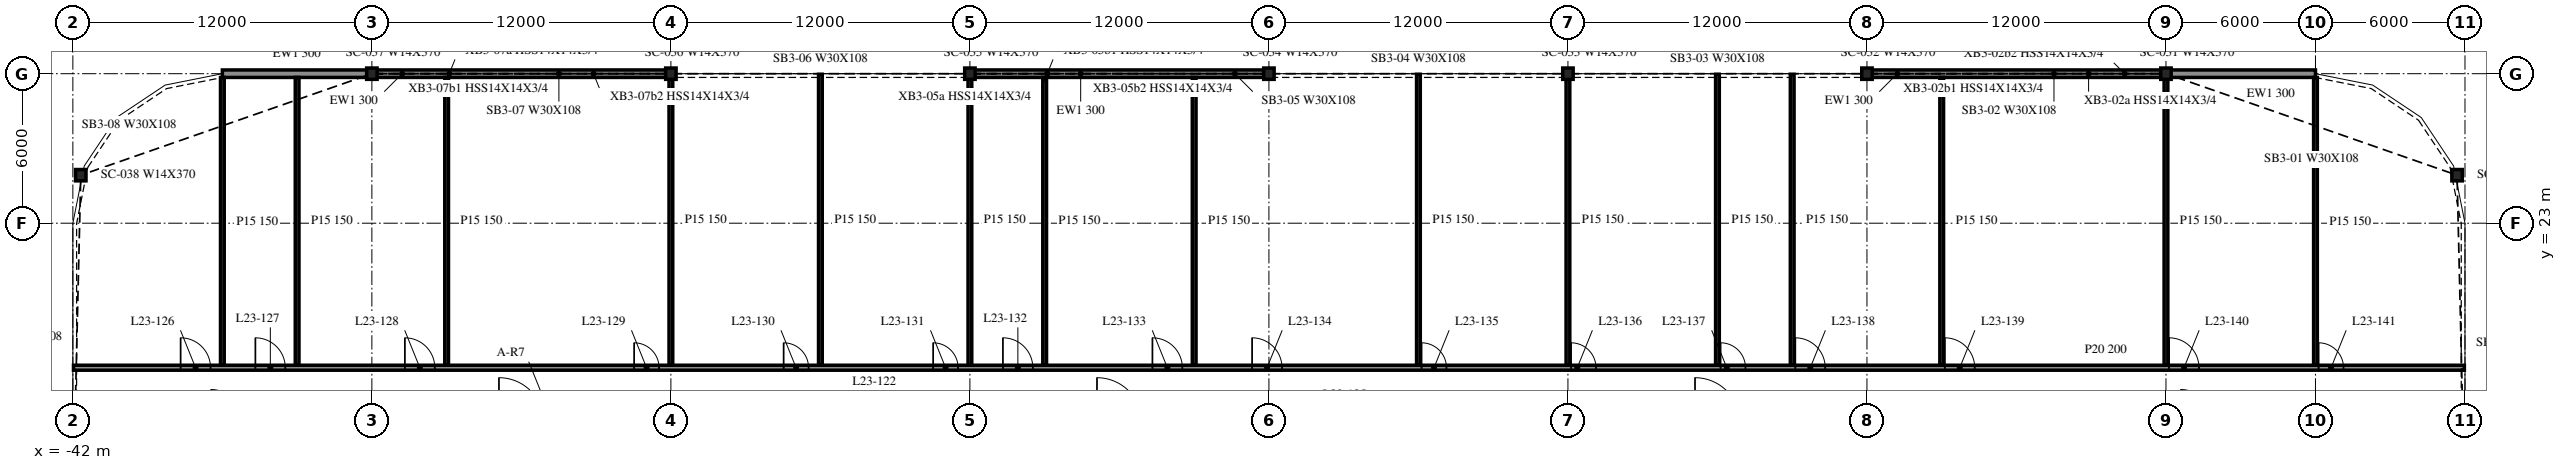
"""IFC4 building model, lengths in metres.
Left out: names, types, materials, properties, quantities, classifications, styles, units other than length and angle.
Written with IfcOpenShell. Run it as: python <this file> out.ifc"""

import sys

from ifc_helpers import new_model, si_unit, direction, frame, frame_2d, origin, origin_2d, place, context, subcontext, project, spatial, rectangle, i_section, extrude, element, fill, save


model = new_model("IFC4")
c1 = context("Model", 3, precision=1e-05, world=origin(), true_north=direction((0.0, 1.0)))
c2 = subcontext(c1, "Body", "Model", "MODEL_VIEW")
j1 = project(units=[si_unit("LENGTHUNIT", "METRE"), si_unit("PLANEANGLEUNIT", "RADIAN")], contexts=[c1])
p1 = place(None, origin())
s1 = spatial("IfcSite", under=j1, at=p1, CompositionType="ELEMENT")
p2 = place(p1, origin())
s2 = spatial("IfcBuilding", under=s1, at=p2, CompositionType="ELEMENT")
p3 = place(p2, frame((0.0, 0.0, 101.2)))
s3 = spatial("IfcBuildingStorey", under=s2, at=p3, CompositionType="ELEMENT", Elevation=101.2)
for number, where, z_axis, x_axis in (
    (1, (53.682, 24.927, -0.34), (0.0, 0.0, 1.0), (1.0, 0.0, 0.0)),
    (2, (42.0, 29.0, -0.34), (0.0, 0.0, 1.0), (1.0, 0.0, 0.0)),
    (3, (30.0, 29.0, -0.34), (0.0, 0.0, 1.0), (1.0, 0.0, 0.0)),
    (4, (18.0, 29.0, -0.34), (0.0, 0.0, 1.0), (1.0, 0.0, 0.0)),
    (5, (6.0, 29.0, -0.34), (0.0, 0.0, 1.0), (1.0, 0.0, 0.0)),
    (6, (-6.0, 29.0, -0.34), (0.0, 0.0, 1.0), (1.0, 0.0, 0.0)),
    (7, (-18.0, 29.0, -0.34), (0.0, 0.0, 1.0), (1.0, 0.0, 0.0)),
    (8, (-30.0, 29.0, -0.34), (0.0, 0.0, 1.0), (1.0, 0.0, 0.0)),
    (9, (-41.682, 24.927, -0.34), (0.0, 0.0, 1.0), (1.0, 0.0, 0.0)),
):
    element("IfcColumn", number, at=place(p3, frame(where, z_axis=z_axis, x_axis=x_axis)), inside=s3, PredefinedType="COLUMN", context=c2, shape_type="SweptSolid", body=[
        extrude(i_section(OverallWidth=0.419, OverallDepth=0.455, WebThickness=0.042, FlangeThickness=0.068, at=origin_2d()), origin(), (0.0, 0.0, 1.0), 4.1),
    ])
p4 = place(p3, frame((48.0, 29.0, 0.0), z_axis=(0.0, 0.0, 1.0), x_axis=(-1.0, 0.0, 0.0)))
e10 = element("IfcWall", 10, at=p4, inside=s3, PredefinedType="NOTDEFINED", context=c2, shape_type="SweptSolid", body=[
    extrude(rectangle(XDim=5.979, YDim=0.3, at=frame_2d((2.99, 0.0))), origin(), (0.0, 0.0, 1.0), 3.003),
])
for number, where, z_axis, x_axis in (
    (11, (41.979, 29.0, 0.0), (0.0, 0.0, 1.0), (-1.0, 0.0, 0.0)),
    (12, (5.979, 29.0, 0.0), (0.0, 0.0, 1.0), (-1.0, 0.0, 0.0)),
    (13, (-18.021, 29.0, 0.0), (0.0, 0.0, 1.0), (-1.0, 0.0, 0.0)),
):
    element("IfcWall", number, at=place(p3, frame(where, z_axis=z_axis, x_axis=x_axis)), inside=s3, PredefinedType="NOTDEFINED", context=c2, shape_type="SweptSolid", body=[
        extrude(rectangle(XDim=11.958, YDim=0.3, at=frame_2d((5.979, 0.0))), origin(), (0.0, 0.0, 1.0), 3.003),
    ])
p5 = place(p3, frame((-30.021, 29.0, 0.0), z_axis=(0.0, 0.0, 1.0), x_axis=(-1.0, 0.0, 0.0)))
e14 = element("IfcWall", 14, at=p5, inside=s3, PredefinedType="NOTDEFINED", context=c2, shape_type="SweptSolid", body=[
    extrude(rectangle(XDim=5.979, YDim=0.3, at=frame_2d((2.99, 0.0))), origin(), (0.0, 0.0, 1.0), 3.003),
])
p6 = place(p3, frame((-41.975, 17.2, 0.0), z_axis=(0.0, 0.0, 1.0), x_axis=(1.0, 0.0, 0.0)))
e15 = element("IfcWall", 15, at=p6, inside=s3, PredefinedType="PARTITIONING", context=c2, shape_type="SweptSolid", body=[
    extrude(rectangle(XDim=95.95, YDim=0.2, at=frame_2d((47.975, 0.0))), origin(), (0.0, 0.0, 1.0), 3.76),
])
p7 = place(p6, frame((4.3, 0.0, 0.0)))
e16 = element("IfcOpeningElement", 16, at=p7, cuts=e15, PredefinedType="OPENING", context=c2, shape_type="SweptSolid", body=[
    extrude(rectangle(XDim=1.2, YDim=2.1, at=frame_2d((0.6, 1.05))), frame((0.0, 0.11, 0.0), z_axis=(0.0, -1.0, 0.0), x_axis=(1.0, 0.0, 0.0)), (0.0, 0.0, 1.0), 0.22),
])
p8 = place(p6, frame((7.3, 0.0, 0.0)))
e17 = element("IfcOpeningElement", 17, at=p8, cuts=e15, PredefinedType="OPENING", context=c2, shape_type="SweptSolid", body=[
    extrude(rectangle(XDim=1.2, YDim=2.1, at=frame_2d((0.6, 1.05))), frame((0.0, 0.11, 0.0), z_axis=(0.0, -1.0, 0.0), x_axis=(1.0, 0.0, 0.0)), (0.0, 0.0, 1.0), 0.22),
])
p9 = place(p6, frame((13.3, 0.0, 0.0)))
e18 = element("IfcOpeningElement", 18, at=p9, cuts=e15, PredefinedType="OPENING", context=c2, shape_type="SweptSolid", body=[
    extrude(rectangle(XDim=1.2, YDim=2.1, at=frame_2d((0.6, 1.05))), frame((0.0, 0.11, 0.0), z_axis=(0.0, -1.0, 0.0), x_axis=(1.0, 0.0, 0.0)), (0.0, 0.0, 1.0), 0.22),
])
p10 = place(p6, frame((22.5, 0.0, 0.0)))
e19 = element("IfcOpeningElement", 19, at=p10, cuts=e15, PredefinedType="OPENING", context=c2, shape_type="SweptSolid", body=[
    extrude(rectangle(XDim=1.0, YDim=2.1, at=frame_2d((0.5, 1.05))), frame((0.0, 0.11, 0.0), z_axis=(0.0, -1.0, 0.0), x_axis=(1.0, 0.0, 0.0)), (0.0, 0.0, 1.0), 0.22),
])
p11 = place(p6, frame((28.5, 0.0, 0.0)))
e20 = element("IfcOpeningElement", 20, at=p11, cuts=e15, PredefinedType="OPENING", context=c2, shape_type="SweptSolid", body=[
    extrude(rectangle(XDim=1.0, YDim=2.1, at=frame_2d((0.5, 1.05))), frame((0.0, 0.11, 0.0), z_axis=(0.0, -1.0, 0.0), x_axis=(1.0, 0.0, 0.0)), (0.0, 0.0, 1.0), 0.22),
])
p12 = place(p6, frame((34.5, 0.0, 0.0)))
e21 = element("IfcOpeningElement", 21, at=p12, cuts=e15, PredefinedType="OPENING", context=c2, shape_type="SweptSolid", body=[
    extrude(rectangle(XDim=1.0, YDim=2.1, at=frame_2d((0.5, 1.05))), frame((0.0, 0.11, 0.0), z_axis=(0.0, -1.0, 0.0), x_axis=(1.0, 0.0, 0.0)), (0.0, 0.0, 1.0), 0.22),
])
p13 = place(p6, frame((37.3, 0.0, 0.0)))
e22 = element("IfcOpeningElement", 22, at=p13, cuts=e15, PredefinedType="OPENING", context=c2, shape_type="SweptSolid", body=[
    extrude(rectangle(XDim=1.2, YDim=2.1, at=frame_2d((0.6, 1.05))), frame((0.0, 0.11, 0.0), z_axis=(0.0, -1.0, 0.0), x_axis=(1.0, 0.0, 0.0)), (0.0, 0.0, 1.0), 0.22),
])
p14 = place(p6, frame((43.3, 0.0, 0.0)))
e23 = element("IfcOpeningElement", 23, at=p14, cuts=e15, PredefinedType="OPENING", context=c2, shape_type="SweptSolid", body=[
    extrude(rectangle(XDim=1.2, YDim=2.1, at=frame_2d((0.6, 1.05))), frame((0.0, 0.11, 0.0), z_axis=(0.0, -1.0, 0.0), x_axis=(1.0, 0.0, 0.0)), (0.0, 0.0, 1.0), 0.22),
])
p15 = place(p6, frame((47.3, 0.0, 0.0)))
e24 = element("IfcOpeningElement", 24, at=p15, cuts=e15, PredefinedType="OPENING", context=c2, shape_type="SweptSolid", body=[
    extrude(rectangle(XDim=1.2, YDim=2.1, at=frame_2d((0.6, 1.05))), frame((0.0, 0.11, 0.0), z_axis=(0.0, -1.0, 0.0), x_axis=(1.0, 0.0, 0.0)), (0.0, 0.0, 1.0), 0.22),
])
p16 = place(p6, frame((54.1, 0.0, 0.0)))
e25 = element("IfcOpeningElement", 25, at=p16, cuts=e15, PredefinedType="OPENING", context=c2, shape_type="SweptSolid", body=[
    extrude(rectangle(XDim=1.0, YDim=2.1, at=frame_2d((0.5, 1.05))), frame((0.0, 0.11, 0.0), z_axis=(0.0, -1.0, 0.0), x_axis=(1.0, 0.0, 0.0)), (0.0, 0.0, 1.0), 0.22),
])
p17 = place(p6, frame((60.1, 0.0, 0.0)))
e26 = element("IfcOpeningElement", 26, at=p17, cuts=e15, PredefinedType="OPENING", context=c2, shape_type="SweptSolid", body=[
    extrude(rectangle(XDim=1.0, YDim=2.1, at=frame_2d((0.5, 1.05))), frame((0.0, 0.11, 0.0), z_axis=(0.0, -1.0, 0.0), x_axis=(1.0, 0.0, 0.0)), (0.0, 0.0, 1.0), 0.22),
])
p18 = place(p6, frame((66.1, 0.0, 0.0)))
e27 = element("IfcOpeningElement", 27, at=p18, cuts=e15, PredefinedType="OPENING", context=c2, shape_type="SweptSolid", body=[
    extrude(rectangle(XDim=1.0, YDim=2.1, at=frame_2d((0.5, 1.05))), frame((0.0, 0.11, 0.0), z_axis=(0.0, -1.0, 0.0), x_axis=(1.0, 0.0, 0.0)), (0.0, 0.0, 1.0), 0.22),
])
p19 = place(p6, frame((69.1, 0.0, 0.0)))
e28 = element("IfcOpeningElement", 28, at=p19, cuts=e15, PredefinedType="OPENING", context=c2, shape_type="SweptSolid", body=[
    extrude(rectangle(XDim=1.2, YDim=2.1, at=frame_2d((0.6, 1.05))), frame((0.0, 0.11, 0.0), z_axis=(0.0, -1.0, 0.0), x_axis=(1.0, 0.0, 0.0)), (0.0, 0.0, 1.0), 0.22),
])
p20 = place(p6, frame((75.1, 0.0, 0.0)))
e29 = element("IfcOpeningElement", 29, at=p20, cuts=e15, PredefinedType="OPENING", context=c2, shape_type="SweptSolid", body=[
    extrude(rectangle(XDim=1.2, YDim=2.1, at=frame_2d((0.6, 1.05))), frame((0.0, 0.11, 0.0), z_axis=(0.0, -1.0, 0.0), x_axis=(1.0, 0.0, 0.0)), (0.0, 0.0, 1.0), 0.22),
])
p21 = place(p6, frame((84.1, 0.0, 0.0)))
e30 = element("IfcOpeningElement", 30, at=p21, cuts=e15, PredefinedType="OPENING", context=c2, shape_type="SweptSolid", body=[
    extrude(rectangle(XDim=1.2, YDim=2.1, at=frame_2d((0.6, 1.05))), frame((0.0, 0.11, 0.0), z_axis=(0.0, -1.0, 0.0), x_axis=(1.0, 0.0, 0.0)), (0.0, 0.0, 1.0), 0.22),
])
p22 = place(p6, frame((90.1, 0.0, 0.0)))
e31 = element("IfcOpeningElement", 31, at=p22, cuts=e15, PredefinedType="OPENING", context=c2, shape_type="SweptSolid", body=[
    extrude(rectangle(XDim=1.0, YDim=2.1, at=frame_2d((0.5, 1.05))), frame((0.0, 0.11, 0.0), z_axis=(0.0, -1.0, 0.0), x_axis=(1.0, 0.0, 0.0)), (0.0, 0.0, 1.0), 0.22),
])
p23 = place(p3, frame((-36.0, 17.3, 0.0), z_axis=(0.0, 0.0, 1.0), x_axis=(0.0, 1.0, 0.0)))
e32 = element("IfcWall", 32, at=p23, inside=s3, PredefinedType="PARTITIONING", context=c2, shape_type="SweptSolid", body=[
    extrude(rectangle(XDim=11.547, YDim=0.15, at=frame_2d((5.773, 0.0))), origin(), (0.0, 0.0, 1.0), 3.76),
])
for number, where, z_axis, x_axis in (
    (33, (-33.0, 17.3, 0.0), (0.0, 0.0, 1.0), (0.0, 1.0, 0.0)),
    (34, (-27.0, 17.3, 0.0), (0.0, 0.0, 1.0), (0.0, 1.0, 0.0)),
):
    element("IfcWall", number, at=place(p3, frame(where, z_axis=z_axis, x_axis=x_axis)), inside=s3, PredefinedType="PARTITIONING", context=c2, shape_type="SweptSolid", body=[
        extrude(rectangle(XDim=11.55, YDim=0.15, at=frame_2d((5.775, 0.0))), origin(), (0.0, 0.0, 1.0), 3.76),
    ])
for number, where, z_axis, x_axis in (
    (35, (-18.0, 17.3, 0.0), (0.0, 0.0, 1.0), (0.0, 1.0, 0.0)),
    (36, (-12.0, 17.3, 0.0), (0.0, 0.0, 1.0), (0.0, 1.0, 0.0)),
    (37, (-6.0, 17.3, 0.0), (0.0, 0.0, 1.0), (0.0, 1.0, 0.0)),
):
    element("IfcWall", number, at=place(p3, frame(where, z_axis=z_axis, x_axis=x_axis)), inside=s3, PredefinedType="PARTITIONING", context=c2, shape_type="SweptSolid", body=[
        extrude(rectangle(XDim=11.675, YDim=0.15, at=frame_2d((5.837, 0.0))), origin(), (0.0, 0.0, 1.0), 3.76),
    ])
for number, where, z_axis, x_axis in (
    (38, (-3.0, 17.3, 0.0), (0.0, 0.0, 1.0), (0.0, 1.0, 0.0)),
    (39, (3.0, 17.3, 0.0), (0.0, 0.0, 1.0), (0.0, 1.0, 0.0)),
):
    element("IfcWall", number, at=place(p3, frame(where, z_axis=z_axis, x_axis=x_axis)), inside=s3, PredefinedType="PARTITIONING", context=c2, shape_type="SweptSolid", body=[
        extrude(rectangle(XDim=11.55, YDim=0.15, at=frame_2d((5.775, 0.0))), origin(), (0.0, 0.0, 1.0), 3.76),
    ])
for number, where, z_axis, x_axis in (
    (40, (12.0, 17.3, 0.0), (0.0, 0.0, 1.0), (0.0, 1.0, 0.0)),
    (41, (18.0, 17.3, 0.0), (0.0, 0.0, 1.0), (0.0, 1.0, 0.0)),
    (42, (24.0, 17.3, 0.0), (0.0, 0.0, 1.0), (0.0, 1.0, 0.0)),
    (43, (27.0, 17.3, 0.0), (0.0, 0.0, 1.0), (0.0, 1.0, 0.0)),
):
    element("IfcWall", number, at=place(p3, frame(where, z_axis=z_axis, x_axis=x_axis)), inside=s3, PredefinedType="PARTITIONING", context=c2, shape_type="SweptSolid", body=[
        extrude(rectangle(XDim=11.675, YDim=0.15, at=frame_2d((5.837, 0.0))), origin(), (0.0, 0.0, 1.0), 3.76),
    ])
for number, where, z_axis, x_axis in (
    (44, (33.0, 17.3, 0.0), (0.0, 0.0, 1.0), (0.0, 1.0, 0.0)),
    (45, (42.0, 17.3, 0.0), (0.0, 0.0, 1.0), (0.0, 1.0, 0.0)),
):
    element("IfcWall", number, at=place(p3, frame(where, z_axis=z_axis, x_axis=x_axis)), inside=s3, PredefinedType="PARTITIONING", context=c2, shape_type="SweptSolid", body=[
        extrude(rectangle(XDim=11.55, YDim=0.15, at=frame_2d((5.775, 0.0))), origin(), (0.0, 0.0, 1.0), 3.76),
    ])
p24 = place(p3, frame((48.0, 17.3, 0.0), z_axis=(0.0, 0.0, 1.0), x_axis=(0.0, 1.0, 0.0)))
e46 = element("IfcWall", 46, at=p24, inside=s3, PredefinedType="PARTITIONING", context=c2, shape_type="SweptSolid", body=[
    extrude(rectangle(XDim=11.547, YDim=0.15, at=frame_2d((5.773, 0.0))), origin(), (0.0, 0.0, 1.0), 3.76),
])
p25 = place(p7, origin())
e47 = element("IfcDoor", 47, at=p25, inside=s3, OperationType="SINGLE_SWING_LEFT", PredefinedType="DOOR", context=c2, shape_type="SweptSolid", body=[
    extrude(rectangle(XDim=1.2, YDim=2.1, at=frame_2d((0.6, 1.05))), frame((0.0, 0.025, 0.0), z_axis=(0.0, -1.0, 0.0), x_axis=(1.0, 0.0, 0.0)), (0.0, 0.0, 1.0), 0.05),
])
fill(e16, e47)
p26 = place(p8, origin())
e48 = element("IfcDoor", 48, at=p26, inside=s3, OperationType="SINGLE_SWING_LEFT", PredefinedType="DOOR", context=c2, shape_type="SweptSolid", body=[
    extrude(rectangle(XDim=1.2, YDim=2.1, at=frame_2d((0.6, 1.05))), frame((0.0, 0.025, 0.0), z_axis=(0.0, -1.0, 0.0), x_axis=(1.0, 0.0, 0.0)), (0.0, 0.0, 1.0), 0.05),
])
fill(e17, e48)
p27 = place(p9, origin())
e49 = element("IfcDoor", 49, at=p27, inside=s3, OperationType="SINGLE_SWING_LEFT", PredefinedType="DOOR", context=c2, shape_type="SweptSolid", body=[
    extrude(rectangle(XDim=1.2, YDim=2.1, at=frame_2d((0.6, 1.05))), frame((0.0, 0.025, 0.0), z_axis=(0.0, -1.0, 0.0), x_axis=(1.0, 0.0, 0.0)), (0.0, 0.0, 1.0), 0.05),
])
fill(e18, e49)
p28 = place(p10, origin())
e50 = element("IfcDoor", 50, at=p28, inside=s3, OperationType="SINGLE_SWING_LEFT", PredefinedType="DOOR", context=c2, shape_type="SweptSolid", body=[
    extrude(rectangle(XDim=1.0, YDim=2.1, at=frame_2d((0.5, 1.05))), frame((0.0, 0.025, 0.0), z_axis=(0.0, -1.0, 0.0), x_axis=(1.0, 0.0, 0.0)), (0.0, 0.0, 1.0), 0.05),
])
fill(e19, e50)
p29 = place(p11, origin())
e51 = element("IfcDoor", 51, at=p29, inside=s3, OperationType="SINGLE_SWING_LEFT", PredefinedType="DOOR", context=c2, shape_type="SweptSolid", body=[
    extrude(rectangle(XDim=1.0, YDim=2.1, at=frame_2d((0.5, 1.05))), frame((0.0, 0.025, 0.0), z_axis=(0.0, -1.0, 0.0), x_axis=(1.0, 0.0, 0.0)), (0.0, 0.0, 1.0), 0.05),
])
fill(e20, e51)
p30 = place(p12, origin())
e52 = element("IfcDoor", 52, at=p30, inside=s3, OperationType="SINGLE_SWING_LEFT", PredefinedType="DOOR", context=c2, shape_type="SweptSolid", body=[
    extrude(rectangle(XDim=1.0, YDim=2.1, at=frame_2d((0.5, 1.05))), frame((0.0, 0.025, 0.0), z_axis=(0.0, -1.0, 0.0), x_axis=(1.0, 0.0, 0.0)), (0.0, 0.0, 1.0), 0.05),
])
fill(e21, e52)
p31 = place(p13, origin())
e53 = element("IfcDoor", 53, at=p31, inside=s3, OperationType="SINGLE_SWING_LEFT", PredefinedType="DOOR", context=c2, shape_type="SweptSolid", body=[
    extrude(rectangle(XDim=1.2, YDim=2.1, at=frame_2d((0.6, 1.05))), frame((0.0, 0.025, 0.0), z_axis=(0.0, -1.0, 0.0), x_axis=(1.0, 0.0, 0.0)), (0.0, 0.0, 1.0), 0.05),
])
fill(e22, e53)
p32 = place(p14, origin())
e54 = element("IfcDoor", 54, at=p32, inside=s3, OperationType="SINGLE_SWING_LEFT", PredefinedType="DOOR", context=c2, shape_type="SweptSolid", body=[
    extrude(rectangle(XDim=1.2, YDim=2.1, at=frame_2d((0.6, 1.05))), frame((0.0, 0.025, 0.0), z_axis=(0.0, -1.0, 0.0), x_axis=(1.0, 0.0, 0.0)), (0.0, 0.0, 1.0), 0.05),
])
fill(e23, e54)
p33 = place(p15, origin())
e55 = element("IfcDoor", 55, at=p33, inside=s3, OperationType="SINGLE_SWING_RIGHT", PredefinedType="DOOR", context=c2, shape_type="SweptSolid", body=[
    extrude(rectangle(XDim=1.2, YDim=2.1, at=frame_2d((0.6, 1.05))), frame((0.0, 0.025, 0.0), z_axis=(0.0, -1.0, 0.0), x_axis=(1.0, 0.0, 0.0)), (0.0, 0.0, 1.0), 0.05),
])
fill(e24, e55)
p34 = place(p16, origin())
e56 = element("IfcDoor", 56, at=p34, inside=s3, OperationType="SINGLE_SWING_RIGHT", PredefinedType="DOOR", context=c2, shape_type="SweptSolid", body=[
    extrude(rectangle(XDim=1.0, YDim=2.1, at=frame_2d((0.5, 1.05))), frame((0.0, 0.025, 0.0), z_axis=(0.0, -1.0, 0.0), x_axis=(1.0, 0.0, 0.0)), (0.0, 0.0, 1.0), 0.05),
])
fill(e25, e56)
p35 = place(p17, origin())
e57 = element("IfcDoor", 57, at=p35, inside=s3, OperationType="SINGLE_SWING_RIGHT", PredefinedType="DOOR", context=c2, shape_type="SweptSolid", body=[
    extrude(rectangle(XDim=1.0, YDim=2.1, at=frame_2d((0.5, 1.05))), frame((0.0, 0.025, 0.0), z_axis=(0.0, -1.0, 0.0), x_axis=(1.0, 0.0, 0.0)), (0.0, 0.0, 1.0), 0.05),
])
fill(e26, e57)
p36 = place(p18, origin())
e58 = element("IfcDoor", 58, at=p36, inside=s3, OperationType="SINGLE_SWING_RIGHT", PredefinedType="DOOR", context=c2, shape_type="SweptSolid", body=[
    extrude(rectangle(XDim=1.0, YDim=2.1, at=frame_2d((0.5, 1.05))), frame((0.0, 0.025, 0.0), z_axis=(0.0, -1.0, 0.0), x_axis=(1.0, 0.0, 0.0)), (0.0, 0.0, 1.0), 0.05),
])
fill(e27, e58)
p37 = place(p19, origin())
e59 = element("IfcDoor", 59, at=p37, inside=s3, OperationType="SINGLE_SWING_RIGHT", PredefinedType="DOOR", context=c2, shape_type="SweptSolid", body=[
    extrude(rectangle(XDim=1.2, YDim=2.1, at=frame_2d((0.6, 1.05))), frame((0.0, 0.025, 0.0), z_axis=(0.0, -1.0, 0.0), x_axis=(1.0, 0.0, 0.0)), (0.0, 0.0, 1.0), 0.05),
])
fill(e28, e59)
p38 = place(p20, origin())
e60 = element("IfcDoor", 60, at=p38, inside=s3, OperationType="SINGLE_SWING_RIGHT", PredefinedType="DOOR", context=c2, shape_type="SweptSolid", body=[
    extrude(rectangle(XDim=1.2, YDim=2.1, at=frame_2d((0.6, 1.05))), frame((0.0, 0.025, 0.0), z_axis=(0.0, -1.0, 0.0), x_axis=(1.0, 0.0, 0.0)), (0.0, 0.0, 1.0), 0.05),
])
fill(e29, e60)
p39 = place(p21, origin())
e61 = element("IfcDoor", 61, at=p39, inside=s3, OperationType="SINGLE_SWING_RIGHT", PredefinedType="DOOR", context=c2, shape_type="SweptSolid", body=[
    extrude(rectangle(XDim=1.2, YDim=2.1, at=frame_2d((0.6, 1.05))), frame((0.0, 0.025, 0.0), z_axis=(0.0, -1.0, 0.0), x_axis=(1.0, 0.0, 0.0)), (0.0, 0.0, 1.0), 0.05),
])
fill(e30, e61)
p40 = place(p22, origin())
e62 = element("IfcDoor", 62, at=p40, inside=s3, OperationType="SINGLE_SWING_RIGHT", PredefinedType="DOOR", context=c2, shape_type="SweptSolid", body=[
    extrude(rectangle(XDim=1.0, YDim=2.1, at=frame_2d((0.5, 1.05))), frame((0.0, 0.025, 0.0), z_axis=(0.0, -1.0, 0.0), x_axis=(1.0, 0.0, 0.0)), (0.0, 0.0, 1.0), 0.05),
])
fill(e31, e62)
save(model, sys.argv[1])
